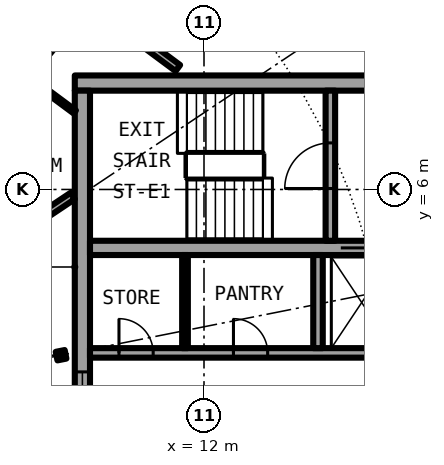
"""IFC4 building model, lengths in metres.
Left out: names, types, materials, properties, quantities, classifications, styles, units other than length and angle.
Written with IfcOpenShell. Run it as: python <this file> out.ifc"""

import sys

from ifc_helpers import new_model, si_unit, direction, frame, frame_2d, origin, origin_2d, place, context, subcontext, project, spatial, rectangle, i_section, extrude, element, fill, save


model = new_model("IFC4")
c1 = context("Model", 3, precision=1e-05, world=origin(), true_north=direction((0.0, 1.0)))
c2 = subcontext(c1, "Body", "Model", "MODEL_VIEW")
j1 = project(units=[si_unit("LENGTHUNIT", "METRE"), si_unit("PLANEANGLEUNIT", "RADIAN")], contexts=[c1])
p1 = place(None, origin())
s1 = spatial("IfcSite", under=j1, at=p1, CompositionType="ELEMENT")
p2 = place(p1, origin())
s2 = spatial("IfcBuilding", under=s1, at=p2, CompositionType="ELEMENT")
p3 = place(p2, frame((0.0, 0.0, 237.1)))
s3 = spatial("IfcBuildingStorey", under=s2, at=p3, CompositionType="ELEMENT", Elevation=237.1)
p4 = place(p3, frame((8.239, 1.639, 0.0), z_axis=(0.0, 0.0, 1.0), x_axis=(0.980785280403, 0.195090322016, 0.0)))
e1 = element("IfcColumn", 1, at=p4, inside=s3, PredefinedType="COLUMN", context=c2, shape_type="SweptSolid", body=[
    extrude(i_section(OverallWidth=0.24, OverallDepth=0.23, WebThickness=0.008, FlangeThickness=0.012, FilletRadius=0.021, at=origin_2d()), origin(), (0.0, 0.0, 1.0), 3.05),
])
p5 = place(p3, frame((22.0, 8.8, 0.0), z_axis=(0.0, 0.0, 1.0), x_axis=(-1.0, 0.0, 0.0)))
e2 = element("IfcWall", 2, at=p5, inside=s3, PredefinedType="SHEAR", context=c2, shape_type="SweptSolid", body=[
    extrude(rectangle(XDim=13.4, YDim=0.4, at=frame_2d((6.7, 0.0))), origin(), (0.0, 0.0, 1.0), 3.05),
])
p6 = place(p5, frame((0.925, 0.0, 0.0)))
e3 = element("IfcOpeningElement", 3, at=p6, cuts=e2, PredefinedType="OPENING", context=c2, shape_type="SweptSolid", body=[
    extrude(rectangle(XDim=1.2, YDim=2.3, at=frame_2d((0.6, 1.15))), frame((0.0, 0.21, 0.0), z_axis=(0.0, -1.0, 0.0), x_axis=(1.0, 0.0, 0.0)), (0.0, 0.0, 1.0), 0.42),
])
p7 = place(p3, frame((8.8, -8.6, 0.0), z_axis=(0.0, 0.0, 1.0), x_axis=(0.0, 1.0, 0.0)))
e4 = element("IfcWall", 4, at=p7, inside=s3, PredefinedType="SHEAR", context=c2, shape_type="SweptSolid", body=[
    extrude(rectangle(XDim=17.2, YDim=0.4, at=frame_2d((8.6, 0.0))), origin(), (0.0, 0.0, 1.0), 3.05),
])
p8 = place(p7, frame((7.4, 0.0, 0.1)))
e5 = element("IfcOpeningElement", 5, at=p8, cuts=e4, PredefinedType="OPENING", context=c2, shape_type="SweptSolid", body=[
    extrude(rectangle(XDim=2.4, YDim=2.2, at=frame_2d((1.2, 1.1))), frame((0.0, 0.21, 0.0), z_axis=(0.0, -1.0, 0.0), x_axis=(1.0, 0.0, 0.0)), (0.0, 0.0, 1.0), 0.42),
])
p9 = place(p3, frame((9.0, 1.7, 0.0), z_axis=(0.0, 0.0, 1.0), x_axis=(1.0, 0.0, 0.0)))
e6 = element("IfcWall", 6, at=p9, inside=s3, PredefinedType="SHEAR", context=c2, shape_type="SweptSolid", body=[
    extrude(rectangle(XDim=10.15, YDim=0.25, at=frame_2d((5.075, 0.0))), origin(), (0.0, 0.0, 1.0), 3.05),
])
p10 = place(p9, frame((0.762, 0.0, 0.0)))
e7 = element("IfcOpeningElement", 7, at=p10, cuts=e6, PredefinedType="OPENING", context=c2, shape_type="SweptSolid", body=[
    extrude(rectangle(XDim=0.9, YDim=2.3, at=frame_2d((0.45, 1.15))), frame((0.0, 0.135, 0.0), z_axis=(0.0, -1.0, 0.0), x_axis=(1.0, 0.0, 0.0)), (0.0, 0.0, 1.0), 0.27),
])
p11 = place(p9, frame((3.775, 0.0, 0.0)))
e8 = element("IfcOpeningElement", 8, at=p11, cuts=e6, PredefinedType="OPENING", context=c2, shape_type="SweptSolid", body=[
    extrude(rectangle(XDim=0.9, YDim=2.3, at=frame_2d((0.45, 1.15))), frame((0.0, 0.135, 0.0), z_axis=(0.0, -1.0, 0.0), x_axis=(1.0, 0.0, 0.0)), (0.0, 0.0, 1.0), 0.27),
])
p12 = place(p9, frame((8.837, 0.0, 0.0)))
e9 = element("IfcOpeningElement", 9, at=p12, cuts=e6, PredefinedType="OPENING", context=c2, shape_type="SweptSolid", body=[
    extrude(rectangle(XDim=0.9, YDim=2.3, at=frame_2d((0.45, 1.15))), frame((0.0, 0.135, 0.0), z_axis=(0.0, -1.0, 0.0), x_axis=(1.0, 0.0, 0.0)), (0.0, 0.0, 1.0), 0.27),
])
p13 = place(p3, frame((9.0, 4.462, 0.0), z_axis=(0.0, 0.0, 1.0), x_axis=(1.0, 0.0, 0.0)))
e10 = element("IfcWall", 10, at=p13, inside=s3, PredefinedType="SHEAR", context=c2, shape_type="SweptSolid", body=[
    extrude(rectangle(XDim=10.15, YDim=0.375, at=frame_2d((5.075, 0.0))), origin(), (0.0, 0.0, 1.0), 3.05),
])
p14 = place(p13, frame((6.6, 0.0, 0.0)))
e11 = element("IfcOpeningElement", 11, at=p14, cuts=e10, PredefinedType="OPENING", context=c2, shape_type="SweptSolid", body=[
    extrude(rectangle(XDim=1.1, YDim=2.3, at=frame_2d((0.55, 1.15))), frame((0.0, 0.198, 0.0), z_axis=(0.0, -1.0, 0.0), x_axis=(1.0, 0.0, 0.0)), (0.0, 0.0, 1.0), 0.395),
])
p15 = place(p3, frame((15.325, 4.65, 0.0), z_axis=(0.0, 0.0, 1.0), x_axis=(0.0, 1.0, 0.0)))
e12 = element("IfcWall", 12, at=p15, inside=s3, PredefinedType="SHEAR", context=c2, shape_type="SweptSolid", body=[
    extrude(rectangle(XDim=3.95, YDim=0.25, at=frame_2d((1.975, 0.0))), origin(), (0.0, 0.0, 1.0), 3.05),
])
p16 = place(p15, frame((1.375, 0.0, 0.0)))
e13 = element("IfcOpeningElement", 13, at=p16, cuts=e12, PredefinedType="OPENING", context=c2, shape_type="SweptSolid", body=[
    extrude(rectangle(XDim=1.2, YDim=2.3, at=frame_2d((0.6, 1.15))), frame((0.0, 0.135, 0.0), z_axis=(0.0, -1.0, 0.0), x_axis=(1.0, 0.0, 0.0)), (0.0, 0.0, 1.0), 0.27),
])
p17 = place(p3, frame((15.0, 1.825, 0.0), z_axis=(0.0, 0.0, 1.0), x_axis=(0.0, 1.0, 0.0)))
e14 = element("IfcWall", 14, at=p17, inside=s3, PredefinedType="SOLIDWALL", context=c2, shape_type="SweptSolid", body=[
    extrude(rectangle(XDim=2.45, YDim=0.25, at=frame_2d((1.225, 0.0))), origin(), (0.0, 0.0, 1.0), 2.7),
])
p18 = place(p3, frame((11.5, 1.825, 0.0), z_axis=(0.0, 0.0, 1.0), x_axis=(0.0, 1.0, 0.0)))
e15 = element("IfcWall", 15, at=p18, inside=s3, PredefinedType="PARTITIONING", context=c2, shape_type="SweptSolid", body=[
    extrude(rectangle(XDim=2.45, YDim=0.15, at=frame_2d((1.225, 0.0))), origin(), (0.0, 0.0, 1.0), 2.7),
])
p19 = place(p3, frame((4.909, 5.958, 0.0), z_axis=(0.0, 0.0, 1.0), x_axis=(0.635941750694, 0.771737059965, 0.0)))
e16 = element("IfcWall", 16, at=p19, inside=s3, PredefinedType="PARTITIONING", context=c2, shape_type="SweptSolid", body=[
    extrude(rectangle(XDim=6.422, YDim=0.1, at=frame_2d((3.211, 0.0))), origin(), (0.0, 0.0, 1.0), 2.7),
])
p20 = place(p19, frame((4.699, 0.0, 0.0)))
e17 = element("IfcOpeningElement", 17, at=p20, cuts=e16, PredefinedType="OPENING", context=c2, shape_type="SweptSolid", body=[
    extrude(rectangle(XDim=0.9, YDim=2.3, at=frame_2d((0.45, 1.15))), frame((0.0, 0.06, 0.0), z_axis=(0.0, -1.0, 0.0), x_axis=(1.0, 0.0, 0.0)), (0.0, 0.0, 1.0), 0.12),
])
p21 = place(p19, frame((1.488, 0.0, 0.0)))
e18 = element("IfcOpeningElement", 18, at=p21, cuts=e16, PredefinedType="OPENING", context=c2, shape_type="SweptSolid", body=[
    extrude(rectangle(XDim=0.9, YDim=2.3, at=frame_2d((0.45, 1.15))), frame((0.0, 0.06, 0.0), z_axis=(0.0, -1.0, 0.0), x_axis=(1.0, 0.0, 0.0)), (0.0, 0.0, 1.0), 0.12),
])
p22 = place(p3, frame((6.513, 4.472, 0.0), z_axis=(0.0, 0.0, 1.0), x_axis=(0.831450132577, 0.555599385382, 0.0)))
e19 = element("IfcWall", 19, at=p22, inside=s3, PredefinedType="PARTITIONING", context=c2, shape_type="SweptSolid", body=[
    extrude(rectangle(XDim=2.443, YDim=0.2, at=frame_2d((1.221, 0.0))), origin(), (0.0, 0.0, 1.0), 2.7),
])
p23 = place(p3, frame((7.374, 8.949, 0.0), z_axis=(0.0, 0.0, 1.0), x_axis=(0.80332760487, -0.595537370157, 0.0)))
e20 = element("IfcWall", 20, at=p23, inside=s3, PredefinedType="PARTITIONING", context=c2, shape_type="SweptSolid", body=[
    extrude(rectangle(XDim=1.526, YDim=0.1, at=frame_2d((0.763, 0.0))), origin(), (0.0, 0.0, 1.0), 2.7),
])
p24 = place(p3, frame((4.357, 14.353, 0.0), z_axis=(0.0, 0.0, 1.0), x_axis=(0.803168959756, -0.595751308923, 0.0)))
e21 = element("IfcWall", 21, at=p24, inside=s3, PredefinedType="PARTITIONING", context=c2, shape_type="SweptSolid", body=[
    extrude(rectangle(XDim=8.659, YDim=0.2, at=frame_2d((4.33, 0.0))), origin(), (0.0, 0.0, 1.0), 2.7),
])
p25 = place(p24, frame((3.829, 0.0, 0.0)))
e22 = element("IfcOpeningElement", 22, at=p25, cuts=e21, PredefinedType="OPENING", context=c2, shape_type="SweptSolid", body=[
    extrude(rectangle(XDim=1.0, YDim=2.3, at=frame_2d((0.5, 1.15))), frame((0.0, 0.11, 0.0), z_axis=(0.0, -1.0, 0.0), x_axis=(1.0, 0.0, 0.0)), (0.0, 0.0, 1.0), 0.22),
])
p26 = place(p14, origin())
e23 = element("IfcDoor", 23, at=p26, inside=s3, OperationType="DOUBLE_DOOR_SLIDING", PredefinedType="DOOR", context=c2, shape_type="SweptSolid", body=[
    extrude(rectangle(XDim=1.1, YDim=2.3, at=frame_2d((0.55, 1.15))), frame((0.0, 0.025, 0.0), z_axis=(0.0, -1.0, 0.0), x_axis=(1.0, 0.0, 0.0)), (0.0, 0.0, 1.0), 0.05),
])
fill(e11, e23)
p27 = place(p10, origin())
e24 = element("IfcDoor", 24, at=p27, inside=s3, OperationType="SINGLE_SWING_RIGHT", PredefinedType="DOOR", context=c2, shape_type="SweptSolid", body=[
    extrude(rectangle(XDim=0.9, YDim=2.3, at=frame_2d((0.45, 1.15))), frame((0.0, 0.025, 0.0), z_axis=(0.0, -1.0, 0.0), x_axis=(1.0, 0.0, 0.0)), (0.0, 0.0, 1.0), 0.05),
])
fill(e7, e24)
p28 = place(p11, origin())
e25 = element("IfcDoor", 25, at=p28, inside=s3, OperationType="SINGLE_SWING_RIGHT", PredefinedType="DOOR", context=c2, shape_type="SweptSolid", body=[
    extrude(rectangle(XDim=0.9, YDim=2.3, at=frame_2d((0.45, 1.15))), frame((0.0, 0.025, 0.0), z_axis=(0.0, -1.0, 0.0), x_axis=(1.0, 0.0, 0.0)), (0.0, 0.0, 1.0), 0.05),
])
fill(e8, e25)
p29 = place(p16, origin())
e26 = element("IfcDoor", 26, at=p29, inside=s3, OperationType="SINGLE_SWING_LEFT", PredefinedType="DOOR", context=c2, shape_type="SweptSolid", body=[
    extrude(rectangle(XDim=1.2, YDim=2.3, at=frame_2d((0.6, 1.15))), frame((0.0, 0.025, 0.0), z_axis=(0.0, -1.0, 0.0), x_axis=(1.0, 0.0, 0.0)), (0.0, 0.0, 1.0), 0.05),
])
fill(e13, e26)
p30 = place(p8, origin())
e27 = element("IfcWindow", 27, at=p30, inside=s3, PartitioningType="SINGLE_PANEL", PredefinedType="WINDOW", context=c2, shape_type="SweptSolid", body=[
    extrude(rectangle(XDim=2.4, YDim=2.2, at=frame_2d((1.2, 1.1))), frame((0.0, 0.03, 0.0), z_axis=(0.0, -1.0, 0.0), x_axis=(1.0, 0.0, 0.0)), (0.0, 0.0, 1.0), 0.06),
])
fill(e5, e27)
p31 = place(p20, origin())
e28 = element("IfcDoor", 28, at=p31, inside=s3, OperationType="SINGLE_SWING_RIGHT", PredefinedType="DOOR", context=c2, shape_type="SweptSolid", body=[
    extrude(rectangle(XDim=0.9, YDim=2.3, at=frame_2d((0.45, 1.15))), frame((0.0, 0.025, 0.0), z_axis=(0.0, -1.0, 0.0), x_axis=(1.0, 0.0, 0.0)), (0.0, 0.0, 1.0), 0.05),
])
fill(e17, e28)
save(model, sys.argv[1])
